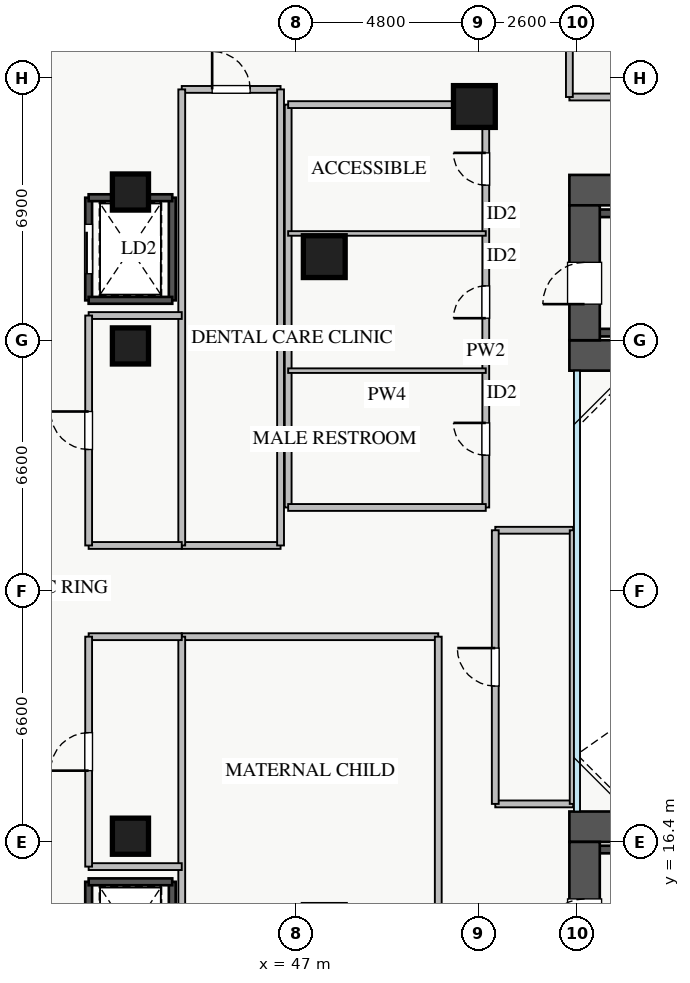
"""IFC4 building model, lengths in metres.
Left out: names, types, materials, properties, quantities, classifications, styles, units other than length and angle.
Written with IfcOpenShell. Run it as: python <this file> out.ifc"""

import sys

from ifc_helpers import new_model, si_unit, direction, frame, frame_2d, origin, origin_2d, place, context, subcontext, project, spatial, rectangle, extrude, source, transform, mapped, element, fill, save


model = new_model("IFC4")
c1 = context("Model", 3, precision=1e-05, world=origin(), true_north=direction((0.0, 1.0)))
c2 = subcontext(c1, "Body", "Model", "MODEL_VIEW")
j1 = project(units=[si_unit("LENGTHUNIT", "METRE"), si_unit("PLANEANGLEUNIT", "RADIAN")], contexts=[c1])
p1 = place(None, origin())
s1 = spatial("IfcSite", under=j1, at=p1, CompositionType="ELEMENT")
p2 = place(p1, origin())
s2 = spatial("IfcBuilding", under=s1, at=p2, CompositionType="ELEMENT")
p3 = place(p2, frame((0.0, 0.0, 9.4)))
s3 = spatial("IfcBuildingStorey", under=s2, at=p3, CompositionType="ELEMENT", Elevation=9.4)
p4 = place(p3, frame((41.55, 30.65, 0.0), z_axis=(0.0, 0.0, 1.0), x_axis=(0.0, 1.0, 0.0)))
e1 = element("IfcWall", 1, at=p4, inside=s3, PredefinedType="SHEAR", context=c2, shape_type="SweptSolid", body=[
    extrude(rectangle(XDim=2.7, YDim=0.18, at=frame_2d((1.35, 0.0))), origin(), (0.0, 0.0, 1.0), 4.18),
])
p5 = place(p4, frame((0.7, 0.0, 0.0)))
e2 = element("IfcOpeningElement", 2, at=p5, cuts=e1, PredefinedType="OPENING", context=c2, shape_type="SweptSolid", body=[
    extrude(rectangle(XDim=1.3, YDim=2.05, at=frame_2d((0.65, 1.025))), frame((0.0, 0.1, 0.0), z_axis=(0.0, -1.0, 0.0), x_axis=(1.0, 0.0, 0.0)), (0.0, 0.0, 1.0), 0.2),
])
p6 = place(p3, frame((43.75, 30.65, 0.0), z_axis=(0.0, 0.0, 1.0), x_axis=(0.0, 1.0, 0.0)))
e3 = element("IfcWall", 3, at=p6, inside=s3, PredefinedType="SHEAR", context=c2, shape_type="SweptSolid", body=[
    extrude(rectangle(XDim=2.7, YDim=0.18, at=frame_2d((1.35, 0.0))), origin(), (0.0, 0.0, 1.0), 4.18),
])
for number, where, z_axis, x_axis in (
    (4, (41.55, 30.65, 0.0), (0.0, 0.0, 1.0), (1.0, 0.0, 0.0)),
    (5, (41.55, 33.35, 0.0), (0.0, 0.0, 1.0), (1.0, 0.0, 0.0)),
):
    element("IfcWall", number, at=place(p3, frame(where, z_axis=z_axis, x_axis=x_axis)), inside=s3, PredefinedType="SHEAR", context=c2, shape_type="SweptSolid", body=[
        extrude(rectangle(XDim=2.2, YDim=0.18, at=frame_2d((1.1, 0.0))), origin(), (0.0, 0.0, 1.0), 4.18),
    ])
p7 = place(p3, frame((41.55, 12.65, 0.0), z_axis=(0.0, 0.0, 1.0), x_axis=(0.0, 1.0, 0.0)))
e6 = element("IfcWall", 6, at=p7, inside=s3, PredefinedType="SHEAR", context=c2, shape_type="SweptSolid", body=[
    extrude(rectangle(XDim=2.7, YDim=0.18, at=frame_2d((1.35, 0.0))), origin(), (0.0, 0.0, 1.0), 4.18),
])
p8 = place(p7, frame((0.7, 0.0, 0.0)))
e7 = element("IfcOpeningElement", 7, at=p8, cuts=e6, PredefinedType="OPENING", context=c2, shape_type="SweptSolid", body=[
    extrude(rectangle(XDim=1.3, YDim=2.05, at=frame_2d((0.65, 1.025))), frame((0.0, 0.1, 0.0), z_axis=(0.0, -1.0, 0.0), x_axis=(1.0, 0.0, 0.0)), (0.0, 0.0, 1.0), 0.2),
])
p9 = place(p3, frame((43.75, 12.65, 0.0), z_axis=(0.0, 0.0, 1.0), x_axis=(0.0, 1.0, 0.0)))
e8 = element("IfcWall", 8, at=p9, inside=s3, PredefinedType="SHEAR", context=c2, shape_type="SweptSolid", body=[
    extrude(rectangle(XDim=2.7, YDim=0.18, at=frame_2d((1.35, 0.0))), origin(), (0.0, 0.0, 1.0), 4.18),
])
p10 = place(p3, frame((41.55, 15.35, 0.0), z_axis=(0.0, 0.0, 1.0), x_axis=(1.0, 0.0, 0.0)))
e9 = element("IfcWall", 9, at=p10, inside=s3, PredefinedType="SHEAR", context=c2, shape_type="SweptSolid", body=[
    extrude(rectangle(XDim=2.2, YDim=0.18, at=frame_2d((1.1, 0.0))), origin(), (0.0, 0.0, 1.0), 4.18),
])
for number, where, z_axis, x_axis in (
    (10, (54.8, 29.8, 0.0), (0.0, 0.0, 1.0), (1.0, 0.0, 0.0)),
    (11, (54.8, 32.94, 0.0), (0.0, 0.0, 1.0), (1.0, 0.0, 0.0)),
    (12, (54.8, 16.2, 0.0), (0.0, 0.0, 1.0), (1.0, 0.0, 0.0)),
):
    element("IfcWall", number, at=place(p3, frame(where, z_axis=z_axis, x_axis=x_axis)), inside=s3, PredefinedType="SHEAR", context=c2, shape_type="SweptSolid", body=[
        extrude(rectangle(XDim=7.15, YDim=0.2, at=frame_2d((3.575, 0.0))), origin(), (0.0, 0.0, 1.0), 4.4),
    ])
p11 = place(p3, frame((54.2, 29.2, 0.0), z_axis=(0.0, 0.0, 1.0), x_axis=(1.0, 0.0, 0.0)))
e13 = element("IfcWall", 13, at=p11, inside=s3, PredefinedType="SHEAR", context=c2, shape_type="SweptSolid", body=[
    extrude(rectangle(XDim=12.6, YDim=0.8, at=frame_2d((6.3, 0.0))), origin(), (0.0, 0.0, 1.0), 4.4),
])
p12 = place(p3, frame((54.2, 33.55, 0.0), z_axis=(0.0, 0.0, 1.0), x_axis=(1.0, 0.0, 0.0)))
e14 = element("IfcWall", 14, at=p12, inside=s3, PredefinedType="SHEAR", context=c2, shape_type="SweptSolid", body=[
    extrude(rectangle(XDim=12.6, YDim=0.8, at=frame_2d((6.3, 0.0))), origin(), (0.0, 0.0, 1.0), 4.4),
])
p13 = place(p12, frame((8.2, 0.0, 0.0)))
e15 = element("IfcOpeningElement", 15, at=p13, cuts=e14, PredefinedType="OPENING", context=c2, shape_type="SweptSolid", body=[
    extrude(rectangle(XDim=1.1, YDim=2.05, at=frame_2d((0.55, 1.025))), frame((0.0, 0.41, 0.0), z_axis=(0.0, -1.0, 0.0), x_axis=(1.0, 0.0, 0.0)), (0.0, 0.0, 1.0), 0.82),
])
p14 = place(p3, frame((54.6, 29.6, 0.0), z_axis=(0.0, 0.0, 1.0), x_axis=(0.0, 1.0, 0.0)))
e16 = element("IfcWall", 16, at=p14, inside=s3, PredefinedType="SHEAR", context=c2, shape_type="SweptSolid", body=[
    extrude(rectangle(XDim=3.55, YDim=0.8, at=frame_2d((1.775, 0.0))), origin(), (0.0, 0.0, 1.0), 4.4),
])
p15 = place(p14, frame((0.95, 0.0, 0.0)))
e17 = element("IfcOpeningElement", 17, at=p15, cuts=e16, PredefinedType="OPENING", context=c2, shape_type="SweptSolid", body=[
    extrude(rectangle(XDim=1.1, YDim=2.05, at=frame_2d((0.55, 1.025))), frame((0.0, 0.41, 0.0), z_axis=(0.0, -1.0, 0.0), x_axis=(1.0, 0.0, 0.0)), (0.0, 0.0, 1.0), 0.82),
])
p16 = place(p3, frame((54.2, 16.8, 0.0), z_axis=(0.0, 0.0, 1.0), x_axis=(1.0, 0.0, 0.0)))
e18 = element("IfcWall", 18, at=p16, inside=s3, PredefinedType="SHEAR", context=c2, shape_type="SweptSolid", body=[
    extrude(rectangle(XDim=12.6, YDim=0.8, at=frame_2d((6.3, 0.0))), origin(), (0.0, 0.0, 1.0), 4.4),
])
p17 = place(p3, frame((54.6, 12.85, 0.0), z_axis=(0.0, 0.0, 1.0), x_axis=(0.0, 1.0, 0.0)))
e19 = element("IfcWall", 19, at=p17, inside=s3, PredefinedType="SHEAR", context=c2, shape_type="SweptSolid", body=[
    extrude(rectangle(XDim=3.55, YDim=0.8, at=frame_2d((1.775, 0.0))), origin(), (0.0, 0.0, 1.0), 4.4),
])
p18 = place(p17, frame((0.95, 0.0, 0.0)))
e20 = element("IfcOpeningElement", 20, at=p18, cuts=e19, PredefinedType="OPENING", context=c2, shape_type="SweptSolid", body=[
    extrude(rectangle(XDim=1.1, YDim=2.05, at=frame_2d((0.55, 1.025))), frame((0.0, 0.41, 0.0), z_axis=(0.0, -1.0, 0.0), x_axis=(1.0, 0.0, 0.0)), (0.0, 0.0, 1.0), 0.82),
])
m1 = source(origin(), c2, "Body", "SweptSolid", [
    extrude(rectangle(XDim=1.1, YDim=1.1, at=origin_2d()), origin(), (0.0, 0.0, 1.0), 4.4),
])
for number, where, z_axis, x_axis in (
    (21, (51.7, 35.75, 0.0), (0.0, 0.0, 1.0), (1.0, 0.0, 0.0)),
    (22, (47.75, 31.8, 0.0), (0.0, 0.0, 1.0), (1.0, 0.0, 0.0)),
):
    element("IfcColumn", number, at=place(p3, frame(where, z_axis=z_axis, x_axis=x_axis)), inside=s3, PredefinedType="COLUMN", context=c2, shape_type="MappedRepresentation", body=[
        mapped(m1, transform((0.0, 0.0, 0.0), x_axis=(1.0, 0.0, 0.0), y_axis=(0.0, 1.0, 0.0), z_axis=(0.0, 0.0, 1.0), scale=1.0)),
    ])
m2 = source(origin(), c2, "Body", "SweptSolid", [
    extrude(rectangle(XDim=0.95, YDim=0.95, at=origin_2d()), origin(), (0.0, 0.0, 1.0), 4.4),
])
for number, where, z_axis, x_axis in (
    (23, (42.65, 16.55, 0.0), (0.0, 0.0, 1.0), (1.0, 0.0, 0.0)),
    (24, (42.65, 29.45, 0.0), (0.0, 0.0, 1.0), (1.0, 0.0, 0.0)),
    (25, (42.65, 33.5, 0.0), (0.0, 0.0, 1.0), (1.0, 0.0, 0.0)),
):
    element("IfcColumn", number, at=place(p3, frame(where, z_axis=z_axis, x_axis=x_axis)), inside=s3, PredefinedType="COLUMN", context=c2, shape_type="MappedRepresentation", body=[
        mapped(m2, transform((0.0, 0.0, 0.0), x_axis=(1.0, 0.0, 0.0), y_axis=(0.0, 1.0, 0.0), z_axis=(0.0, 0.0, 1.0), scale=1.0)),
    ])
p19 = place(p3, frame((52.0, 25.2, 0.0), z_axis=(0.0, 0.0, 1.0), x_axis=(0.0, 1.0, 0.0)))
e26 = element("IfcWall", 26, at=p19, inside=s3, PredefinedType="PARTITIONING", context=c2, shape_type="SweptSolid", body=[
    extrude(rectangle(XDim=10.6, YDim=0.18, at=frame_2d((5.3, 0.0))), origin(), (0.0, 0.0, 1.0), 4.18),
])
p20 = place(p19, frame((1.375, 0.0, 0.0)))
e27 = element("IfcOpeningElement", 27, at=p20, cuts=e26, PredefinedType="OPENING", context=c2, shape_type="SweptSolid", body=[
    extrude(rectangle(XDim=0.85, YDim=2.05, at=frame_2d((0.425, 1.025))), frame((0.0, 0.1, 0.0), z_axis=(0.0, -1.0, 0.0), x_axis=(1.0, 0.0, 0.0)), (0.0, 0.0, 1.0), 0.2),
])
p21 = place(p19, frame((4.98, 0.0, 0.0)))
e28 = element("IfcOpeningElement", 28, at=p21, cuts=e26, PredefinedType="OPENING", context=c2, shape_type="SweptSolid", body=[
    extrude(rectangle(XDim=0.85, YDim=2.05, at=frame_2d((0.425, 1.025))), frame((0.0, 0.1, 0.0), z_axis=(0.0, -1.0, 0.0), x_axis=(1.0, 0.0, 0.0)), (0.0, 0.0, 1.0), 0.2),
])
p22 = place(p19, frame((8.48, 0.0, 0.0)))
e29 = element("IfcOpeningElement", 29, at=p22, cuts=e26, PredefinedType="OPENING", context=c2, shape_type="SweptSolid", body=[
    extrude(rectangle(XDim=0.85, YDim=2.05, at=frame_2d((0.425, 1.025))), frame((0.0, 0.1, 0.0), z_axis=(0.0, -1.0, 0.0), x_axis=(1.0, 0.0, 0.0)), (0.0, 0.0, 1.0), 0.2),
])
p23 = place(p3, frame((46.8, 25.2, 0.0), z_axis=(0.0, 0.0, 1.0), x_axis=(0.0, 1.0, 0.0)))
e30 = element("IfcWall", 30, at=p23, inside=s3, PredefinedType="PARTITIONING", context=c2, shape_type="SweptSolid", body=[
    extrude(rectangle(XDim=10.6, YDim=0.18, at=frame_2d((5.3, 0.0))), origin(), (0.0, 0.0, 1.0), 4.18),
])
for number, where, z_axis, x_axis in (
    (31, (46.8, 25.2, 0.0), (0.0, 0.0, 1.0), (1.0, 0.0, 0.0)),
    (32, (46.8, 35.8, 0.0), (0.0, 0.0, 1.0), (1.0, 0.0, 0.0)),
):
    element("IfcWall", number, at=place(p3, frame(where, z_axis=z_axis, x_axis=x_axis)), inside=s3, PredefinedType="PARTITIONING", context=c2, shape_type="SweptSolid", body=[
        extrude(rectangle(XDim=5.2, YDim=0.18, at=frame_2d((2.6, 0.0))), origin(), (0.0, 0.0, 1.0), 4.18),
    ])
for number, where, z_axis, x_axis in (
    (33, (46.8, 28.8, 0.0), (0.0, 0.0, 1.0), (1.0, 0.0, 0.0)),
    (34, (46.8, 32.41, 0.0), (0.0, 0.0, 1.0), (1.0, 0.0, 0.0)),
):
    element("IfcWall", number, at=place(p3, frame(where, z_axis=z_axis, x_axis=x_axis)), inside=s3, PredefinedType="PLUMBINGWALL", context=c2, shape_type="SweptSolid", body=[
        extrude(rectangle(XDim=5.2, YDim=0.12, at=frame_2d((2.6, 0.0))), origin(), (0.0, 0.0, 1.0), 4.18),
    ])
p24 = place(p3, frame((44.0, 21.8, 0.0), z_axis=(0.0, 0.0, 1.0), x_axis=(1.0, 0.0, 0.0)))
e35 = element("IfcWall", 35, at=p24, inside=s3, PredefinedType="PARTITIONING", context=c2, shape_type="SweptSolid", body=[
    extrude(rectangle(XDim=6.75, YDim=0.18, at=frame_2d((3.375, 0.0))), origin(), (0.0, 0.0, 1.0), 4.18),
])
for number, where, z_axis, x_axis in (
    (36, (44.0, 9.8, 0.0), (0.0, 0.0, 1.0), (0.0, 1.0, 0.0)),
    (37, (50.75, 9.8, 0.0), (0.0, 0.0, 1.0), (0.0, 1.0, 0.0)),
):
    element("IfcWall", number, at=place(p3, frame(where, z_axis=z_axis, x_axis=x_axis)), inside=s3, PredefinedType="PARTITIONING", context=c2, shape_type="SweptSolid", body=[
        extrude(rectangle(XDim=12.0, YDim=0.18, at=frame_2d((6.0, 0.0))), origin(), (0.0, 0.0, 1.0), 4.18),
    ])
p25 = place(p3, frame((44.0, 24.2, 0.0), z_axis=(0.0, 0.0, 1.0), x_axis=(1.0, 0.0, 0.0)))
e38 = element("IfcWall", 38, at=p25, inside=s3, PredefinedType="PARTITIONING", context=c2, shape_type="SweptSolid", body=[
    extrude(rectangle(XDim=2.6, YDim=0.18, at=frame_2d((1.3, 0.0))), origin(), (0.0, 0.0, 1.0), 4.18),
])
p26 = place(p3, frame((44.0, 36.2, 0.0), z_axis=(0.0, 0.0, 1.0), x_axis=(1.0, 0.0, 0.0)))
e39 = element("IfcWall", 39, at=p26, inside=s3, PredefinedType="PARTITIONING", context=c2, shape_type="SweptSolid", body=[
    extrude(rectangle(XDim=2.6, YDim=0.18, at=frame_2d((1.3, 0.0))), origin(), (0.0, 0.0, 1.0), 4.18),
])
p27 = place(p26, frame((0.8, 0.0, 0.0)))
e40 = element("IfcOpeningElement", 40, at=p27, cuts=e39, PredefinedType="OPENING", context=c2, shape_type="SweptSolid", body=[
    extrude(rectangle(XDim=1.0, YDim=2.05, at=frame_2d((0.5, 1.025))), frame((0.0, 0.1, 0.0), z_axis=(0.0, -1.0, 0.0), x_axis=(1.0, 0.0, 0.0)), (0.0, 0.0, 1.0), 0.2),
])
for number, where, z_axis, x_axis in (
    (41, (44.0, 24.2, 0.0), (0.0, 0.0, 1.0), (0.0, 1.0, 0.0)),
    (42, (46.6, 24.2, 0.0), (0.0, 0.0, 1.0), (0.0, 1.0, 0.0)),
):
    element("IfcWall", number, at=place(p3, frame(where, z_axis=z_axis, x_axis=x_axis)), inside=s3, PredefinedType="PARTITIONING", context=c2, shape_type="SweptSolid", body=[
        extrude(rectangle(XDim=12.0, YDim=0.18, at=frame_2d((6.0, 0.0))), origin(), (0.0, 0.0, 1.0), 4.18),
    ])
for number, where, z_axis, x_axis in (
    (43, (41.55, 24.2, 0.0), (0.0, 0.0, 1.0), (1.0, 0.0, 0.0)),
    (44, (41.55, 30.25, 0.0), (0.0, 0.0, 1.0), (1.0, 0.0, 0.0)),
):
    element("IfcWall", number, at=place(p3, frame(where, z_axis=z_axis, x_axis=x_axis)), inside=s3, PredefinedType="PARTITIONING", context=c2, shape_type="SweptSolid", body=[
        extrude(rectangle(XDim=2.45, YDim=0.18, at=frame_2d((1.225, 0.0))), origin(), (0.0, 0.0, 1.0), 4.18),
    ])
p28 = place(p3, frame((41.55, 24.2, 0.0), z_axis=(0.0, 0.0, 1.0), x_axis=(0.0, 1.0, 0.0)))
e45 = element("IfcWall", 45, at=p28, inside=s3, PredefinedType="PARTITIONING", context=c2, shape_type="SweptSolid", body=[
    extrude(rectangle(XDim=6.05, YDim=0.18, at=frame_2d((3.025, 0.0))), origin(), (0.0, 0.0, 1.0), 4.18),
])
p29 = place(p28, frame((2.525, 0.0, 0.0)))
e46 = element("IfcOpeningElement", 46, at=p29, cuts=e45, PredefinedType="OPENING", context=c2, shape_type="SweptSolid", body=[
    extrude(rectangle(XDim=1.0, YDim=2.05, at=frame_2d((0.5, 1.025))), frame((0.0, 0.1, 0.0), z_axis=(0.0, -1.0, 0.0), x_axis=(1.0, 0.0, 0.0)), (0.0, 0.0, 1.0), 0.2),
])
for number, where, z_axis, x_axis in (
    (47, (41.55, 15.75, 0.0), (0.0, 0.0, 1.0), (1.0, 0.0, 0.0)),
    (48, (41.55, 21.8, 0.0), (0.0, 0.0, 1.0), (1.0, 0.0, 0.0)),
):
    element("IfcWall", number, at=place(p3, frame(where, z_axis=z_axis, x_axis=x_axis)), inside=s3, PredefinedType="PARTITIONING", context=c2, shape_type="SweptSolid", body=[
        extrude(rectangle(XDim=2.45, YDim=0.18, at=frame_2d((1.225, 0.0))), origin(), (0.0, 0.0, 1.0), 4.18),
    ])
p30 = place(p3, frame((41.55, 15.75, 0.0), z_axis=(0.0, 0.0, 1.0), x_axis=(0.0, 1.0, 0.0)))
e49 = element("IfcWall", 49, at=p30, inside=s3, PredefinedType="PARTITIONING", context=c2, shape_type="SweptSolid", body=[
    extrude(rectangle(XDim=6.05, YDim=0.18, at=frame_2d((3.025, 0.0))), origin(), (0.0, 0.0, 1.0), 4.18),
])
p31 = place(p30, frame((2.525, 0.0, 0.0)))
e50 = element("IfcOpeningElement", 50, at=p31, cuts=e49, PredefinedType="OPENING", context=c2, shape_type="SweptSolid", body=[
    extrude(rectangle(XDim=1.0, YDim=2.05, at=frame_2d((0.5, 1.025))), frame((0.0, 0.1, 0.0), z_axis=(0.0, -1.0, 0.0), x_axis=(1.0, 0.0, 0.0)), (0.0, 0.0, 1.0), 0.2),
])
for number, where, z_axis, x_axis in (
    (51, (52.25, 17.4, 0.0), (0.0, 0.0, 1.0), (1.0, 0.0, 0.0)),
    (52, (52.25, 24.6, 0.0), (0.0, 0.0, 1.0), (1.0, 0.0, 0.0)),
):
    element("IfcWall", number, at=place(p3, frame(where, z_axis=z_axis, x_axis=x_axis)), inside=s3, PredefinedType="PARTITIONING", context=c2, shape_type="SweptSolid", body=[
        extrude(rectangle(XDim=2.05, YDim=0.18, at=frame_2d((1.025, 0.0))), origin(), (0.0, 0.0, 1.0), 4.18),
    ])
p32 = place(p3, frame((52.25, 17.4, 0.0), z_axis=(0.0, 0.0, 1.0), x_axis=(0.0, 1.0, 0.0)))
e53 = element("IfcWall", 53, at=p32, inside=s3, PredefinedType="PARTITIONING", context=c2, shape_type="SweptSolid", body=[
    extrude(rectangle(XDim=7.2, YDim=0.18, at=frame_2d((3.6, 0.0))), origin(), (0.0, 0.0, 1.0), 4.18),
])
p33 = place(p32, frame((3.1, 0.0, 0.0)))
e54 = element("IfcOpeningElement", 54, at=p33, cuts=e53, PredefinedType="OPENING", context=c2, shape_type="SweptSolid", body=[
    extrude(rectangle(XDim=1.0, YDim=2.05, at=frame_2d((0.5, 1.025))), frame((0.0, 0.1, 0.0), z_axis=(0.0, -1.0, 0.0), x_axis=(1.0, 0.0, 0.0)), (0.0, 0.0, 1.0), 0.2),
])
p34 = place(p3, frame((54.3, 17.4, 0.0), z_axis=(0.0, 0.0, 1.0), x_axis=(0.0, 1.0, 0.0)))
e55 = element("IfcWall", 55, at=p34, inside=s3, PredefinedType="PARTITIONING", context=c2, shape_type="SweptSolid", body=[
    extrude(rectangle(XDim=7.2, YDim=0.18, at=frame_2d((3.6, 0.0))), origin(), (0.0, 0.0, 1.0), 4.18),
])
p35 = place(p3, frame((54.2, 36.0, 0.0), z_axis=(0.0, 0.0, 1.0), x_axis=(1.0, 0.0, 0.0)))
e56 = element("IfcWall", 56, at=p35, inside=s3, PredefinedType="PARTITIONING", context=c2, shape_type="SweptSolid", body=[
    extrude(rectangle(XDim=17.6, YDim=0.18, at=frame_2d((8.8, 0.0))), origin(), (0.0, 0.0, 1.0), 3.675),
])
p36 = place(p35, frame((8.3, 0.0, 0.0)))
e57 = element("IfcOpeningElement", 57, at=p36, cuts=e56, PredefinedType="OPENING", context=c2, shape_type="SweptSolid", body=[
    extrude(rectangle(XDim=1.0, YDim=2.05, at=frame_2d((0.5, 1.025))), frame((0.0, 0.1, 0.0), z_axis=(0.0, -1.0, 0.0), x_axis=(1.0, 0.0, 0.0)), (0.0, 0.0, 1.0), 0.2),
])
p37 = place(p3, frame((54.2, 36.0, 0.0), z_axis=(0.0, 0.0, 1.0), x_axis=(0.0, 1.0, 0.0)))
e58 = element("IfcWall", 58, at=p37, inside=s3, PredefinedType="PARTITIONING", context=c2, shape_type="SweptSolid", body=[
    extrude(rectangle(XDim=5.6, YDim=0.18, at=frame_2d((2.8, 0.0))), origin(), (0.0, 0.0, 1.0), 4.18),
])
m3 = source(origin(), c2, "Body", "SweptSolid", [
    extrude(rectangle(XDim=1.1, YDim=2.05, at=frame_2d((0.55, 1.025))), frame((0.0, 0.025, 0.0), z_axis=(0.0, -1.0, 0.0), x_axis=(1.0, 0.0, 0.0)), (0.0, 0.0, 1.0), 0.05),
])
p38 = place(p15, origin())
e59 = element("IfcDoor", 59, at=p38, inside=s3, OperationType="SINGLE_SWING_LEFT", PredefinedType="DOOR", context=c2, shape_type="MappedRepresentation", body=[
    mapped(m3, transform((0.0, 0.0, 0.0), x_axis=(1.0, 0.0, 0.0), y_axis=(0.0, 1.0, 0.0), z_axis=(0.0, 0.0, 1.0), scale=1.0)),
])
fill(e17, e59)
p39 = place(p18, origin())
e60 = element("IfcDoor", 60, at=p39, inside=s3, OperationType="SINGLE_SWING_LEFT", PredefinedType="DOOR", context=c2, shape_type="MappedRepresentation", body=[
    mapped(m3, transform((0.0, 0.0, 0.0), x_axis=(1.0, 0.0, 0.0), y_axis=(0.0, 1.0, 0.0), z_axis=(0.0, 0.0, 1.0), scale=1.0)),
])
fill(e20, e60)
m4 = source(origin(), c2, "Body", "SweptSolid", [
    extrude(rectangle(XDim=1.3, YDim=2.05, at=frame_2d((0.65, 1.025))), frame((0.0, 0.025, 0.0), z_axis=(0.0, -1.0, 0.0), x_axis=(1.0, 0.0, 0.0)), (0.0, 0.0, 1.0), 0.05),
])
p40 = place(p5, origin())
e61 = element("IfcDoor", 61, at=p40, inside=s3, OperationType="SLIDING_TO_LEFT", PredefinedType="DOOR", context=c2, shape_type="MappedRepresentation", body=[
    mapped(m4, transform((0.0, 0.0, 0.0), x_axis=(1.0, 0.0, 0.0), y_axis=(0.0, 1.0, 0.0), z_axis=(0.0, 0.0, 1.0), scale=1.0)),
])
fill(e2, e61)
m5 = source(origin(), c2, "Body", "SweptSolid", [
    extrude(rectangle(XDim=0.85, YDim=2.05, at=frame_2d((0.425, 1.025))), frame((0.0, 0.025, 0.0), z_axis=(0.0, -1.0, 0.0), x_axis=(1.0, 0.0, 0.0)), (0.0, 0.0, 1.0), 0.05),
])
p41 = place(p20, origin())
e62 = element("IfcDoor", 62, at=p41, inside=s3, OperationType="SINGLE_SWING_RIGHT", PredefinedType="DOOR", context=c2, shape_type="MappedRepresentation", body=[
    mapped(m5, transform((0.0, 0.0, 0.0), x_axis=(1.0, 0.0, 0.0), y_axis=(0.0, 1.0, 0.0), z_axis=(0.0, 0.0, 1.0), scale=1.0)),
])
fill(e27, e62)
p42 = place(p21, origin())
e63 = element("IfcDoor", 63, at=p42, inside=s3, OperationType="SINGLE_SWING_LEFT", PredefinedType="DOOR", context=c2, shape_type="MappedRepresentation", body=[
    mapped(m5, transform((0.0, 0.0, 0.0), x_axis=(1.0, 0.0, 0.0), y_axis=(0.0, 1.0, 0.0), z_axis=(0.0, 0.0, 1.0), scale=1.0)),
])
fill(e28, e63)
p43 = place(p22, origin())
e64 = element("IfcDoor", 64, at=p43, inside=s3, OperationType="SINGLE_SWING_RIGHT", PredefinedType="DOOR", context=c2, shape_type="MappedRepresentation", body=[
    mapped(m5, transform((0.0, 0.0, 0.0), x_axis=(1.0, 0.0, 0.0), y_axis=(0.0, 1.0, 0.0), z_axis=(0.0, 0.0, 1.0), scale=1.0)),
])
fill(e29, e64)
m6 = source(origin(), c2, "Body", "SweptSolid", [
    extrude(rectangle(XDim=1.0, YDim=2.05, at=frame_2d((0.5, 1.025))), frame((0.0, 0.025, 0.0), z_axis=(0.0, -1.0, 0.0), x_axis=(1.0, 0.0, 0.0)), (0.0, 0.0, 1.0), 0.05),
])
p44 = place(p27, origin())
e65 = element("IfcDoor", 65, at=p44, inside=s3, OperationType="SINGLE_SWING_LEFT", PredefinedType="DOOR", context=c2, shape_type="MappedRepresentation", body=[
    mapped(m6, transform((0.0, 0.0, 0.0), x_axis=(1.0, 0.0, 0.0), y_axis=(0.0, 1.0, 0.0), z_axis=(0.0, 0.0, 1.0), scale=1.0)),
])
fill(e40, e65)
p45 = place(p29, origin())
e66 = element("IfcDoor", 66, at=p45, inside=s3, OperationType="SINGLE_SWING_RIGHT", PredefinedType="DOOR", context=c2, shape_type="MappedRepresentation", body=[
    mapped(m6, transform((0.0, 0.0, 0.0), x_axis=(1.0, 0.0, 0.0), y_axis=(0.0, 1.0, 0.0), z_axis=(0.0, 0.0, 1.0), scale=1.0)),
])
fill(e46, e66)
p46 = place(p31, origin())
e67 = element("IfcDoor", 67, at=p46, inside=s3, OperationType="SINGLE_SWING_LEFT", PredefinedType="DOOR", context=c2, shape_type="MappedRepresentation", body=[
    mapped(m6, transform((0.0, 0.0, 0.0), x_axis=(1.0, 0.0, 0.0), y_axis=(0.0, 1.0, 0.0), z_axis=(0.0, 0.0, 1.0), scale=1.0)),
])
fill(e50, e67)
p47 = place(p33, origin())
e68 = element("IfcDoor", 68, at=p47, inside=s3, OperationType="SINGLE_SWING_RIGHT", PredefinedType="DOOR", context=c2, shape_type="MappedRepresentation", body=[
    mapped(m6, transform((0.0, 0.0, 0.0), x_axis=(1.0, 0.0, 0.0), y_axis=(0.0, 1.0, 0.0), z_axis=(0.0, 0.0, 1.0), scale=1.0)),
])
fill(e54, e68)
save(model, sys.argv[1])
